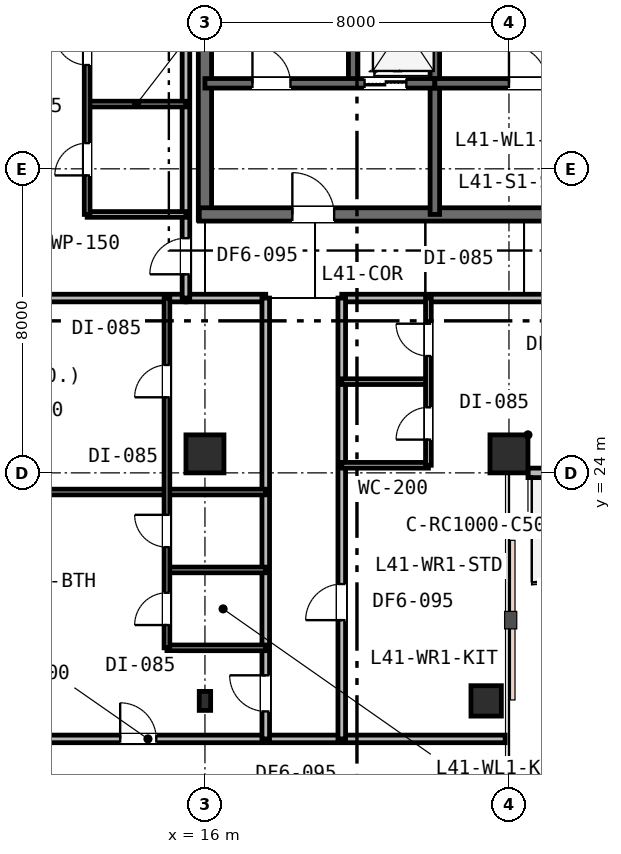
"""IFC4 building model, lengths in metres.
Left out: names, types, materials, properties, quantities, classifications, styles, units other than length and angle.
Written with IfcOpenShell. Run it as: python <this file> out.ifc"""

import sys

from ifc_helpers import new_model, si_unit, direction, frame, frame_2d, origin, origin_2d, place, context, subcontext, project, spatial, rectangle, i_section, extrude, element, fill, save


model = new_model("IFC4")
c1 = context("Model", 3, precision=1e-05, world=origin(), true_north=direction((0.0, 1.0)))
c2 = subcontext(c1, "Body", "Model", "MODEL_VIEW")
j1 = project(units=[si_unit("LENGTHUNIT", "METRE"), si_unit("PLANEANGLEUNIT", "RADIAN")], contexts=[c1])
p1 = place(None, origin())
s1 = spatial("IfcSite", under=j1, at=p1, CompositionType="ELEMENT")
p2 = place(p1, origin())
s2 = spatial("IfcBuilding", under=s1, at=p2, CompositionType="ELEMENT")
p3 = place(p2, frame((0.0, 0.0, 161.4)))
s3 = spatial("IfcBuildingStorey", under=s2, at=p3, CompositionType="ELEMENT", Elevation=161.4)
p4 = place(p3, frame((16.0, 30.65, 0.0), z_axis=(0.0, 0.0, 1.0), x_axis=(0.0, 1.0, 0.0)))
e1 = element("IfcWall", 1, at=p4, inside=s3, PredefinedType="SHEAR", context=c2, shape_type="SweptSolid", body=[
    extrude(rectangle(XDim=12.3, YDim=0.35, at=frame_2d((6.15, 0.0))), origin(), (0.0, 0.0, 1.0), 3.6),
])
p5 = place(p3, frame((15.85, 30.8, 0.0), z_axis=(0.0, 0.0, 1.0), x_axis=(1.0, 0.0, 0.0)))
e2 = element("IfcWall", 2, at=p5, inside=s3, PredefinedType="SHEAR", context=c2, shape_type="SweptSolid", body=[
    extrude(rectangle(XDim=11.2, YDim=0.35, at=frame_2d((5.6, 0.0))), origin(), (0.0, 0.0, 1.0), 3.6),
])
p6 = place(p5, frame((2.45, 0.0, 0.0)))
e3 = element("IfcOpeningElement", 3, at=p6, cuts=e2, PredefinedType="OPENING", context=c2, shape_type="SweptSolid", body=[
    extrude(rectangle(XDim=1.1, YDim=2.15, at=frame_2d((0.55, 1.075))), frame((0.0, 0.185, 0.0), z_axis=(0.0, -1.0, 0.0), x_axis=(1.0, 0.0, 0.0)), (0.0, 0.0, 1.0), 0.37),
])
p7 = place(p3, frame((19.9, 34.25, 0.0), z_axis=(0.0, 0.0, 1.0), x_axis=(0.0, 1.0, 0.0)))
e4 = element("IfcWall", 4, at=p7, inside=s3, PredefinedType="SHEAR", context=c2, shape_type="SweptSolid", body=[
    extrude(rectangle(XDim=8.65, YDim=0.25, at=frame_2d((4.325, 0.0))), origin(), (0.0, 0.0, 1.0), 3.6),
])
p8 = place(p3, frame((22.05, 30.8, 0.0), z_axis=(0.0, 0.0, 1.0), x_axis=(0.0, 1.0, 0.0)))
e5 = element("IfcWall", 5, at=p8, inside=s3, PredefinedType="SHEAR", context=c2, shape_type="SweptSolid", body=[
    extrude(rectangle(XDim=6.45, YDim=0.25, at=frame_2d((3.225, 0.0))), origin(), (0.0, 0.0, 1.0), 3.6),
])
p9 = place(p3, frame((16.0, 34.25, 0.0), z_axis=(0.0, 0.0, 1.0), x_axis=(1.0, 0.0, 0.0)))
e6 = element("IfcWall", 6, at=p9, inside=s3, PredefinedType="SHEAR", context=c2, shape_type="SweptSolid", body=[
    extrude(rectangle(XDim=6.05, YDim=0.25, at=frame_2d((3.025, 0.0))), origin(), (0.0, 0.0, 1.0), 3.6),
])
p10 = place(p9, frame((1.25, 0.0, 0.0)))
e7 = element("IfcOpeningElement", 7, at=p10, cuts=e6, PredefinedType="OPENING", context=c2, shape_type="SweptSolid", body=[
    extrude(rectangle(XDim=1.0, YDim=2.15, at=frame_2d((0.5, 1.075))), frame((0.0, 0.135, 0.0), z_axis=(0.0, -1.0, 0.0), x_axis=(1.0, 0.0, 0.0)), (0.0, 0.0, 1.0), 0.27),
])
p11 = place(p9, frame((4.2, 0.0, 0.0)))
e8 = element("IfcOpeningElement", 8, at=p11, cuts=e6, PredefinedType="OPENING", context=c2, shape_type="SweptSolid", body=[
    extrude(rectangle(XDim=1.1, YDim=2.15, at=frame_2d((0.55, 1.075))), frame((0.0, 0.135, 0.0), z_axis=(0.0, -1.0, 0.0), x_axis=(1.0, 0.0, 0.0)), (0.0, 0.0, 1.0), 0.27),
])
p12 = place(p3, frame((22.05, 34.25, 0.0), z_axis=(0.0, 0.0, 1.0), x_axis=(1.0, 0.0, 0.0)))
e9 = element("IfcWall", 9, at=p12, inside=s3, PredefinedType="SHEAR", context=c2, shape_type="SweptSolid", body=[
    extrude(rectangle(XDim=5.0, YDim=0.25, at=frame_2d((2.5, 0.0))), origin(), (0.0, 0.0, 1.0), 3.6),
])
p13 = place(p12, frame((1.95, 0.0, 0.0)))
e10 = element("IfcOpeningElement", 10, at=p13, cuts=e9, PredefinedType="OPENING", context=c2, shape_type="SweptSolid", body=[
    extrude(rectangle(XDim=1.0, YDim=2.15, at=frame_2d((0.5, 1.075))), frame((0.0, 0.135, 0.0), z_axis=(0.0, -1.0, 0.0), x_axis=(1.0, 0.0, 0.0)), (0.0, 0.0, 1.0), 0.27),
])
for number, where, z_axis, x_axis in (
    (11, (16.0, 24.5, 0.0), (0.0, 0.0, 1.0), (1.0, 0.0, 0.0)),
    (12, (24.0, 24.5, 0.0), (0.0, 0.0, 1.0), (1.0, 0.0, 0.0)),
):
    element("IfcColumn", number, at=place(p3, frame(where, z_axis=z_axis, x_axis=x_axis)), inside=s3, PredefinedType="COLUMN", context=c2, shape_type="SweptSolid", body=[
        extrude(rectangle(XDim=1.0, YDim=1.0, at=origin_2d()), origin(), (0.0, 0.0, 1.0), 3.6),
    ])
p14 = place(p3, frame((23.4, 18.0, 0.0), z_axis=(0.0, 0.0, 1.0), x_axis=(1.0, 0.0, 0.0)))
e13 = element("IfcColumn", 13, at=p14, inside=s3, PredefinedType="COLUMN", context=c2, shape_type="SweptSolid", body=[
    extrude(rectangle(XDim=0.8, YDim=0.8, at=origin_2d()), origin(), (0.0, 0.0, 1.0), 3.6),
])
p15 = place(p3, frame((16.0, 18.0, 0.0), z_axis=(0.0, 0.0, 1.0), x_axis=(1.0, 0.0, 0.0)))
e14 = element("IfcColumn", 14, at=p15, inside=s3, PredefinedType="COLUMN", context=c2, shape_type="SweptSolid", body=[
    extrude(i_section(OverallWidth=0.3, OverallDepth=0.5, WebThickness=0.015, FlangeThickness=0.028, FilletRadius=0.027, at=origin_2d()), origin(), (0.0, 0.0, 1.0), 3.6),
])
p16 = place(p3, frame((24.5, 24.0, 0.0), z_axis=(0.0, 0.0, 1.0), x_axis=(1.0, 0.0, 0.0)))
e15 = element("IfcWall", 15, at=p16, inside=s3, PredefinedType="STANDARD", context=c2, shape_type="SweptSolid", body=[
    extrude(rectangle(XDim=1.35, YDim=0.25, at=frame_2d((0.675, 0.0))), origin(), (0.0, 0.0, 1.0), 3.01),
])
p17 = place(p3, frame((5.1, 28.6, 0.0), z_axis=(0.0, 0.0, 1.0), x_axis=(1.0, 0.0, 0.0)))
e16 = element("IfcWall", 16, at=p17, inside=s3, PredefinedType="PARTITIONING", context=c2, shape_type="SweptSolid", body=[
    extrude(rectangle(XDim=10.4, YDim=0.2, at=frame_2d((5.2, 0.0))), origin(), (0.0, 0.0, 1.0), 2.93),
])
p18 = place(p3, frame((15.5, 28.6, 0.0), z_axis=(0.0, 0.0, 1.0), x_axis=(1.0, 0.0, 0.0)))
e17 = element("IfcWall", 17, at=p18, inside=s3, PredefinedType="PARTITIONING", context=c2, shape_type="SweptSolid", body=[
    extrude(rectangle(XDim=2.1, YDim=0.2, at=frame_2d((1.05, 0.0))), origin(), (0.0, 0.0, 1.0), 2.93),
])
p19 = place(p3, frame((19.6, 28.6, 0.0), z_axis=(0.0, 0.0, 1.0), x_axis=(1.0, 0.0, 0.0)))
e18 = element("IfcWall", 18, at=p19, inside=s3, PredefinedType="PARTITIONING", context=c2, shape_type="SweptSolid", body=[
    extrude(rectangle(XDim=31.3, YDim=0.2, at=frame_2d((15.65, 0.0))), origin(), (0.0, 0.0, 1.0), 2.93),
])
p20 = place(p19, frame((5.445, 0.0, 0.0)))
e19 = element("IfcOpeningElement", 19, at=p20, cuts=e18, PredefinedType="OPENING", context=c2, shape_type="SweptSolid", body=[
    extrude(rectangle(XDim=0.95, YDim=2.15, at=frame_2d((0.475, 1.075))), frame((0.0, 0.11, 0.0), z_axis=(0.0, -1.0, 0.0), x_axis=(1.0, 0.0, 0.0)), (0.0, 0.0, 1.0), 0.22),
])
p21 = place(p19, frame((13.35, 0.0, 0.0)))
e20 = element("IfcOpeningElement", 20, at=p21, cuts=e18, PredefinedType="OPENING", context=c2, shape_type="SweptSolid", body=[
    extrude(rectangle(XDim=0.95, YDim=2.15, at=frame_2d((0.475, 1.075))), frame((0.0, 0.11, 0.0), z_axis=(0.0, -1.0, 0.0), x_axis=(1.0, 0.0, 0.0)), (0.0, 0.0, 1.0), 0.22),
])
p22 = place(p19, frame((21.925, 0.0, 0.0)))
e21 = element("IfcOpeningElement", 21, at=p22, cuts=e18, PredefinedType="OPENING", context=c2, shape_type="SweptSolid", body=[
    extrude(rectangle(XDim=0.95, YDim=2.15, at=frame_2d((0.475, 1.075))), frame((0.0, 0.11, 0.0), z_axis=(0.0, -1.0, 0.0), x_axis=(1.0, 0.0, 0.0)), (0.0, 0.0, 1.0), 0.22),
])
p23 = place(p3, frame((15.5, 28.6, 0.0), z_axis=(0.0, 0.0, 1.0), x_axis=(0.0, 1.0, 0.0)))
e22 = element("IfcWall", 22, at=p23, inside=s3, PredefinedType="PARTITIONING", context=c2, shape_type="SweptSolid", body=[
    extrude(rectangle(XDim=14.3, YDim=0.2, at=frame_2d((7.15, 0.0))), origin(), (0.0, 0.0, 1.0), 2.93),
])
p24 = place(p23, frame((0.625, 0.0, 0.0)))
e23 = element("IfcOpeningElement", 23, at=p24, cuts=e22, PredefinedType="OPENING", context=c2, shape_type="SweptSolid", body=[
    extrude(rectangle(XDim=0.95, YDim=2.15, at=frame_2d((0.475, 1.075))), frame((0.0, 0.11, 0.0), z_axis=(0.0, -1.0, 0.0), x_axis=(1.0, 0.0, 0.0)), (0.0, 0.0, 1.0), 0.22),
])
p25 = place(p3, frame((12.9, 30.8, 0.0), z_axis=(0.0, 0.0, 1.0), x_axis=(1.0, 0.0, 0.0)))
e24 = element("IfcWall", 24, at=p25, inside=s3, PredefinedType="PARTITIONING", context=c2, shape_type="SweptSolid", body=[
    extrude(rectangle(XDim=2.6, YDim=0.15, at=frame_2d((1.3, 0.0))), origin(), (0.0, 0.0, 1.0), 2.93),
])
p26 = place(p3, frame((12.9, 33.704, 0.0), z_axis=(0.0, 0.0, 1.0), x_axis=(1.0, 0.0, 0.0)))
e25 = element("IfcWall", 25, at=p26, inside=s3, PredefinedType="PARTITIONING", context=c2, shape_type="SweptSolid", body=[
    extrude(rectangle(XDim=2.6, YDim=0.15, at=frame_2d((1.3, 0.0))), origin(), (0.0, 0.0, 1.0), 3.33),
])
p27 = place(p3, frame((12.9, 30.8, 0.0), z_axis=(0.0, 0.0, 1.0), x_axis=(0.0, 1.0, 0.0)))
e26 = element("IfcWall", 26, at=p27, inside=s3, PredefinedType="PARTITIONING", context=c2, shape_type="SweptSolid", body=[
    extrude(rectangle(XDim=5.808, YDim=0.15, at=frame_2d((2.904, 0.0))), origin(), (0.0, 0.0, 1.0), 2.93),
])
p28 = place(p27, frame((1.027, 0.0, 0.0)))
e27 = element("IfcOpeningElement", 27, at=p28, cuts=e26, PredefinedType="OPENING", context=c2, shape_type="SweptSolid", body=[
    extrude(rectangle(XDim=0.85, YDim=2.15, at=frame_2d((0.425, 1.075))), frame((0.0, 0.085, 0.0), z_axis=(0.0, -1.0, 0.0), x_axis=(1.0, 0.0, 0.0)), (0.0, 0.0, 1.0), 0.17),
])
p29 = place(p27, frame((3.931, 0.0, 0.0)))
e28 = element("IfcOpeningElement", 28, at=p29, cuts=e26, PredefinedType="OPENING", context=c2, shape_type="SweptSolid", body=[
    extrude(rectangle(XDim=0.85, YDim=2.15, at=frame_2d((0.425, 1.075))), frame((0.0, 0.085, 0.0), z_axis=(0.0, -1.0, 0.0), x_axis=(1.0, 0.0, 0.0)), (0.0, 0.0, 1.0), 0.17),
])
p30 = place(p3, frame((5.1, 17.0, 0.0), z_axis=(0.0, 0.0, 1.0), x_axis=(1.0, 0.0, 0.0)))
e29 = element("IfcWall", 29, at=p30, inside=s3, PredefinedType="PARTITIONING", context=c2, shape_type="SweptSolid", body=[
    extrude(rectangle(XDim=18.8, YDim=0.2, at=frame_2d((9.4, 0.0))), origin(), (0.0, 0.0, 1.0), 2.93),
])
p31 = place(p30, frame((8.669, 0.0, 0.0)))
e30 = element("IfcOpeningElement", 30, at=p31, cuts=e29, PredefinedType="OPENING", context=c2, shape_type="SweptSolid", body=[
    extrude(rectangle(XDim=0.95, YDim=2.15, at=frame_2d((0.475, 1.075))), frame((0.0, 0.11, 0.0), z_axis=(0.0, -1.0, 0.0), x_axis=(1.0, 0.0, 0.0)), (0.0, 0.0, 1.0), 0.22),
])
p32 = place(p3, frame((17.6, 17.0, 0.0), z_axis=(0.0, 0.0, 1.0), x_axis=(0.0, 1.0, 0.0)))
e31 = element("IfcWall", 31, at=p32, inside=s3, PredefinedType="PARTITIONING", context=c2, shape_type="SweptSolid", body=[
    extrude(rectangle(XDim=11.6, YDim=0.2, at=frame_2d((5.8, 0.0))), origin(), (0.0, 0.0, 1.0), 2.93),
])
p33 = place(p32, frame((0.723, 0.0, 0.0)))
e32 = element("IfcOpeningElement", 32, at=p33, cuts=e31, PredefinedType="OPENING", context=c2, shape_type="SweptSolid", body=[
    extrude(rectangle(XDim=0.95, YDim=2.15, at=frame_2d((0.475, 1.075))), frame((0.0, 0.11, 0.0), z_axis=(0.0, -1.0, 0.0), x_axis=(1.0, 0.0, 0.0)), (0.0, 0.0, 1.0), 0.22),
])
for number, where, z_axis, x_axis in (
    (33, (15.0, 19.396, 0.0), (0.0, 0.0, 1.0), (1.0, 0.0, 0.0)),
    (34, (15.0, 21.446, 0.0), (0.0, 0.0, 1.0), (1.0, 0.0, 0.0)),
):
    element("IfcWall", number, at=place(p3, frame(where, z_axis=z_axis, x_axis=x_axis)), inside=s3, PredefinedType="PARTITIONING", context=c2, shape_type="SweptSolid", body=[
        extrude(rectangle(XDim=2.6, YDim=0.15, at=frame_2d((1.3, 0.0))), origin(), (0.0, 0.0, 1.0), 2.93),
    ])
p34 = place(p3, frame((5.1, 23.496, 0.0), z_axis=(0.0, 0.0, 1.0), x_axis=(1.0, 0.0, 0.0)))
e35 = element("IfcWall", 35, at=p34, inside=s3, PredefinedType="PARTITIONING", context=c2, shape_type="SweptSolid", body=[
    extrude(rectangle(XDim=12.5, YDim=0.15, at=frame_2d((6.25, 0.0))), origin(), (0.0, 0.0, 1.0), 2.93),
])
p35 = place(p34, frame((4.692, 0.0, 0.0)))
e36 = element("IfcOpeningElement", 36, at=p35, cuts=e35, PredefinedType="OPENING", context=c2, shape_type="SweptSolid", body=[
    extrude(rectangle(XDim=0.9, YDim=2.15, at=frame_2d((0.45, 1.075))), frame((0.0, 0.085, 0.0), z_axis=(0.0, -1.0, 0.0), x_axis=(1.0, 0.0, 0.0)), (0.0, 0.0, 1.0), 0.17),
])
p36 = place(p3, frame((15.0, 19.396, 0.0), z_axis=(0.0, 0.0, 1.0), x_axis=(0.0, 1.0, 0.0)))
e37 = element("IfcWall", 37, at=p36, inside=s3, PredefinedType="PARTITIONING", context=c2, shape_type="SweptSolid", body=[
    extrude(rectangle(XDim=9.204, YDim=0.15, at=frame_2d((4.602, 0.0))), origin(), (0.0, 0.0, 1.0), 2.93),
])
p37 = place(p36, frame((0.6, 0.0, 0.0)))
e38 = element("IfcOpeningElement", 38, at=p37, cuts=e37, PredefinedType="OPENING", context=c2, shape_type="SweptSolid", body=[
    extrude(rectangle(XDim=0.85, YDim=2.15, at=frame_2d((0.425, 1.075))), frame((0.0, 0.085, 0.0), z_axis=(0.0, -1.0, 0.0), x_axis=(1.0, 0.0, 0.0)), (0.0, 0.0, 1.0), 0.17),
])
p38 = place(p36, frame((2.65, 0.0, 0.0)))
e39 = element("IfcOpeningElement", 39, at=p38, cuts=e37, PredefinedType="OPENING", context=c2, shape_type="SweptSolid", body=[
    extrude(rectangle(XDim=0.85, YDim=2.15, at=frame_2d((0.425, 1.075))), frame((0.0, 0.085, 0.0), z_axis=(0.0, -1.0, 0.0), x_axis=(1.0, 0.0, 0.0)), (0.0, 0.0, 1.0), 0.17),
])
p39 = place(p36, frame((6.593, 0.0, 0.0)))
e40 = element("IfcOpeningElement", 40, at=p39, cuts=e37, PredefinedType="OPENING", context=c2, shape_type="SweptSolid", body=[
    extrude(rectangle(XDim=0.85, YDim=2.15, at=frame_2d((0.425, 1.075))), frame((0.0, 0.085, 0.0), z_axis=(0.0, -1.0, 0.0), x_axis=(1.0, 0.0, 0.0)), (0.0, 0.0, 1.0), 0.17),
])
p40 = place(p3, frame((19.6, 17.0, 0.0), z_axis=(0.0, 0.0, 1.0), x_axis=(0.0, 1.0, 0.0)))
e41 = element("IfcWall", 41, at=p40, inside=s3, PredefinedType="PARTITIONING", context=c2, shape_type="SweptSolid", body=[
    extrude(rectangle(XDim=11.6, YDim=0.2, at=frame_2d((5.8, 0.0))), origin(), (0.0, 0.0, 1.0), 2.93),
])
p41 = place(p40, frame((3.125, 0.0, 0.0)))
e42 = element("IfcOpeningElement", 42, at=p41, cuts=e41, PredefinedType="OPENING", context=c2, shape_type="SweptSolid", body=[
    extrude(rectangle(XDim=0.95, YDim=2.15, at=frame_2d((0.475, 1.075))), frame((0.0, 0.11, 0.0), z_axis=(0.0, -1.0, 0.0), x_axis=(1.0, 0.0, 0.0)), (0.0, 0.0, 1.0), 0.22),
])
p42 = place(p3, frame((19.6, 24.2, 0.0), z_axis=(0.0, 0.0, 1.0), x_axis=(1.0, 0.0, 0.0)))
e43 = element("IfcWall", 43, at=p42, inside=s3, PredefinedType="PARTITIONING", context=c2, shape_type="SweptSolid", body=[
    extrude(rectangle(XDim=2.28, YDim=0.15, at=frame_2d((1.14, 0.0))), origin(), (0.0, 0.0, 1.0), 2.93),
])
p43 = place(p3, frame((19.6, 26.4, 0.0), z_axis=(0.0, 0.0, 1.0), x_axis=(1.0, 0.0, 0.0)))
e44 = element("IfcWall", 44, at=p43, inside=s3, PredefinedType="PARTITIONING", context=c2, shape_type="SweptSolid", body=[
    extrude(rectangle(XDim=2.28, YDim=0.15, at=frame_2d((1.14, 0.0))), origin(), (0.0, 0.0, 1.0), 2.96),
])
p44 = place(p3, frame((21.88, 24.2, 0.0), z_axis=(0.0, 0.0, 1.0), x_axis=(0.0, 1.0, 0.0)))
e45 = element("IfcWall", 45, at=p44, inside=s3, PredefinedType="PARTITIONING", context=c2, shape_type="SweptSolid", body=[
    extrude(rectangle(XDim=4.4, YDim=0.15, at=frame_2d((2.2, 0.0))), origin(), (0.0, 0.0, 1.0), 2.93),
])
p45 = place(p44, frame((0.675, 0.0, 0.0)))
e46 = element("IfcOpeningElement", 46, at=p45, cuts=e45, PredefinedType="OPENING", context=c2, shape_type="SweptSolid", body=[
    extrude(rectangle(XDim=0.85, YDim=2.15, at=frame_2d((0.425, 1.075))), frame((0.0, 0.085, 0.0), z_axis=(0.0, -1.0, 0.0), x_axis=(1.0, 0.0, 0.0)), (0.0, 0.0, 1.0), 0.17),
])
p46 = place(p44, frame((2.875, 0.0, 0.0)))
e47 = element("IfcOpeningElement", 47, at=p46, cuts=e45, PredefinedType="OPENING", context=c2, shape_type="SweptSolid", body=[
    extrude(rectangle(XDim=0.85, YDim=2.15, at=frame_2d((0.425, 1.075))), frame((0.0, 0.085, 0.0), z_axis=(0.0, -1.0, 0.0), x_axis=(1.0, 0.0, 0.0)), (0.0, 0.0, 1.0), 0.17),
])
p47 = place(p10, origin())
e48 = element("IfcDoor", 48, at=p47, inside=s3, OperationType="SINGLE_SWING_LEFT", PredefinedType="DOOR", context=c2, shape_type="SweptSolid", body=[
    extrude(rectangle(XDim=1.0, YDim=2.15, at=frame_2d((0.5, 1.075))), frame((0.0, 0.025, 0.0), z_axis=(0.0, -1.0, 0.0), x_axis=(1.0, 0.0, 0.0)), (0.0, 0.0, 1.0), 0.05),
])
fill(e7, e48)
p48 = place(p6, origin())
e49 = element("IfcDoor", 49, at=p48, inside=s3, OperationType="SINGLE_SWING_LEFT", PredefinedType="DOOR", context=c2, shape_type="SweptSolid", body=[
    extrude(rectangle(XDim=1.1, YDim=2.15, at=frame_2d((0.55, 1.075))), frame((0.0, 0.025, 0.0), z_axis=(0.0, -1.0, 0.0), x_axis=(1.0, 0.0, 0.0)), (0.0, 0.0, 1.0), 0.05),
])
fill(e3, e49)
p49 = place(p13, origin())
e50 = element("IfcDoor", 50, at=p49, inside=s3, OperationType="SINGLE_SWING_LEFT", PredefinedType="DOOR", context=c2, shape_type="SweptSolid", body=[
    extrude(rectangle(XDim=1.0, YDim=2.15, at=frame_2d((0.5, 1.075))), frame((0.0, 0.025, 0.0), z_axis=(0.0, -1.0, 0.0), x_axis=(1.0, 0.0, 0.0)), (0.0, 0.0, 1.0), 0.05),
])
fill(e10, e50)
p50 = place(p24, origin())
e51 = element("IfcDoor", 51, at=p50, inside=s3, OperationType="SINGLE_SWING_LEFT", PredefinedType="DOOR", context=c2, shape_type="SweptSolid", body=[
    extrude(rectangle(XDim=0.95, YDim=2.15, at=frame_2d((0.475, 1.075))), frame((0.0, 0.025, 0.0), z_axis=(0.0, -1.0, 0.0), x_axis=(1.0, 0.0, 0.0)), (0.0, 0.0, 1.0), 0.05),
])
fill(e23, e51)
p51 = place(p28, origin())
e52 = element("IfcDoor", 52, at=p51, inside=s3, OperationType="SINGLE_SWING_LEFT", PredefinedType="DOOR", context=c2, shape_type="SweptSolid", body=[
    extrude(rectangle(XDim=0.85, YDim=2.15, at=frame_2d((0.425, 1.075))), frame((0.0, 0.025, 0.0), z_axis=(0.0, -1.0, 0.0), x_axis=(1.0, 0.0, 0.0)), (0.0, 0.0, 1.0), 0.05),
])
fill(e27, e52)
p52 = place(p29, origin())
e53 = element("IfcDoor", 53, at=p52, inside=s3, OperationType="SINGLE_SWING_RIGHT", PredefinedType="DOOR", context=c2, shape_type="SweptSolid", body=[
    extrude(rectangle(XDim=0.85, YDim=2.15, at=frame_2d((0.425, 1.075))), frame((0.0, 0.025, 0.0), z_axis=(0.0, -1.0, 0.0), x_axis=(1.0, 0.0, 0.0)), (0.0, 0.0, 1.0), 0.05),
])
fill(e28, e53)
p53 = place(p33, origin())
e54 = element("IfcDoor", 54, at=p53, inside=s3, OperationType="SINGLE_SWING_RIGHT", PredefinedType="DOOR", context=c2, shape_type="SweptSolid", body=[
    extrude(rectangle(XDim=0.95, YDim=2.15, at=frame_2d((0.475, 1.075))), frame((0.0, 0.025, 0.0), z_axis=(0.0, -1.0, 0.0), x_axis=(1.0, 0.0, 0.0)), (0.0, 0.0, 1.0), 0.05),
])
fill(e32, e54)
p54 = place(p37, origin())
e55 = element("IfcDoor", 55, at=p54, inside=s3, OperationType="SINGLE_SWING_LEFT", PredefinedType="DOOR", context=c2, shape_type="SweptSolid", body=[
    extrude(rectangle(XDim=0.85, YDim=2.15, at=frame_2d((0.425, 1.075))), frame((0.0, 0.025, 0.0), z_axis=(0.0, -1.0, 0.0), x_axis=(1.0, 0.0, 0.0)), (0.0, 0.0, 1.0), 0.05),
])
fill(e38, e55)
p55 = place(p38, origin())
e56 = element("IfcDoor", 56, at=p55, inside=s3, OperationType="SINGLE_SWING_RIGHT", PredefinedType="DOOR", context=c2, shape_type="SweptSolid", body=[
    extrude(rectangle(XDim=0.85, YDim=2.15, at=frame_2d((0.425, 1.075))), frame((0.0, 0.025, 0.0), z_axis=(0.0, -1.0, 0.0), x_axis=(1.0, 0.0, 0.0)), (0.0, 0.0, 1.0), 0.05),
])
fill(e39, e56)
p56 = place(p39, origin())
e57 = element("IfcDoor", 57, at=p56, inside=s3, OperationType="SINGLE_SWING_LEFT", PredefinedType="DOOR", context=c2, shape_type="SweptSolid", body=[
    extrude(rectangle(XDim=0.85, YDim=2.15, at=frame_2d((0.425, 1.075))), frame((0.0, 0.025, 0.0), z_axis=(0.0, -1.0, 0.0), x_axis=(1.0, 0.0, 0.0)), (0.0, 0.0, 1.0), 0.05),
])
fill(e40, e57)
p57 = place(p41, origin())
e58 = element("IfcDoor", 58, at=p57, inside=s3, OperationType="SINGLE_SWING_LEFT", PredefinedType="DOOR", context=c2, shape_type="SweptSolid", body=[
    extrude(rectangle(XDim=0.95, YDim=2.15, at=frame_2d((0.475, 1.075))), frame((0.0, 0.025, 0.0), z_axis=(0.0, -1.0, 0.0), x_axis=(1.0, 0.0, 0.0)), (0.0, 0.0, 1.0), 0.05),
])
fill(e42, e58)
p58 = place(p45, origin())
e59 = element("IfcDoor", 59, at=p58, inside=s3, OperationType="SINGLE_SWING_LEFT", PredefinedType="DOOR", context=c2, shape_type="SweptSolid", body=[
    extrude(rectangle(XDim=0.85, YDim=2.15, at=frame_2d((0.425, 1.075))), frame((0.0, 0.025, 0.0), z_axis=(0.0, -1.0, 0.0), x_axis=(1.0, 0.0, 0.0)), (0.0, 0.0, 1.0), 0.05),
])
fill(e46, e59)
p59 = place(p46, origin())
e60 = element("IfcDoor", 60, at=p59, inside=s3, OperationType="SINGLE_SWING_RIGHT", PredefinedType="DOOR", context=c2, shape_type="SweptSolid", body=[
    extrude(rectangle(XDim=0.85, YDim=2.15, at=frame_2d((0.425, 1.075))), frame((0.0, 0.025, 0.0), z_axis=(0.0, -1.0, 0.0), x_axis=(1.0, 0.0, 0.0)), (0.0, 0.0, 1.0), 0.05),
])
fill(e47, e60)
p60 = place(p31, origin())
e61 = element("IfcDoor", 61, at=p60, inside=s3, OperationType="SINGLE_SWING_LEFT", PredefinedType="DOOR", context=c2, shape_type="SweptSolid", body=[
    extrude(rectangle(XDim=0.95, YDim=2.15, at=frame_2d((0.475, 1.075))), frame((0.0, 0.025, 0.0), z_axis=(0.0, -1.0, 0.0), x_axis=(1.0, 0.0, 0.0)), (0.0, 0.0, 1.0), 0.05),
])
fill(e30, e61)
p61 = place(p11, origin())
e62 = element("IfcDoor", 62, at=p61, inside=s3, OperationType="DOUBLE_DOOR_SLIDING", PredefinedType="DOOR", context=c2, shape_type="SweptSolid", body=[
    extrude(rectangle(XDim=1.1, YDim=2.15, at=frame_2d((0.55, 1.075))), frame((0.0, 0.025, 0.0), z_axis=(0.0, -1.0, 0.0), x_axis=(1.0, 0.0, 0.0)), (0.0, 0.0, 1.0), 0.05),
])
fill(e8, e62)
save(model, sys.argv[1])
